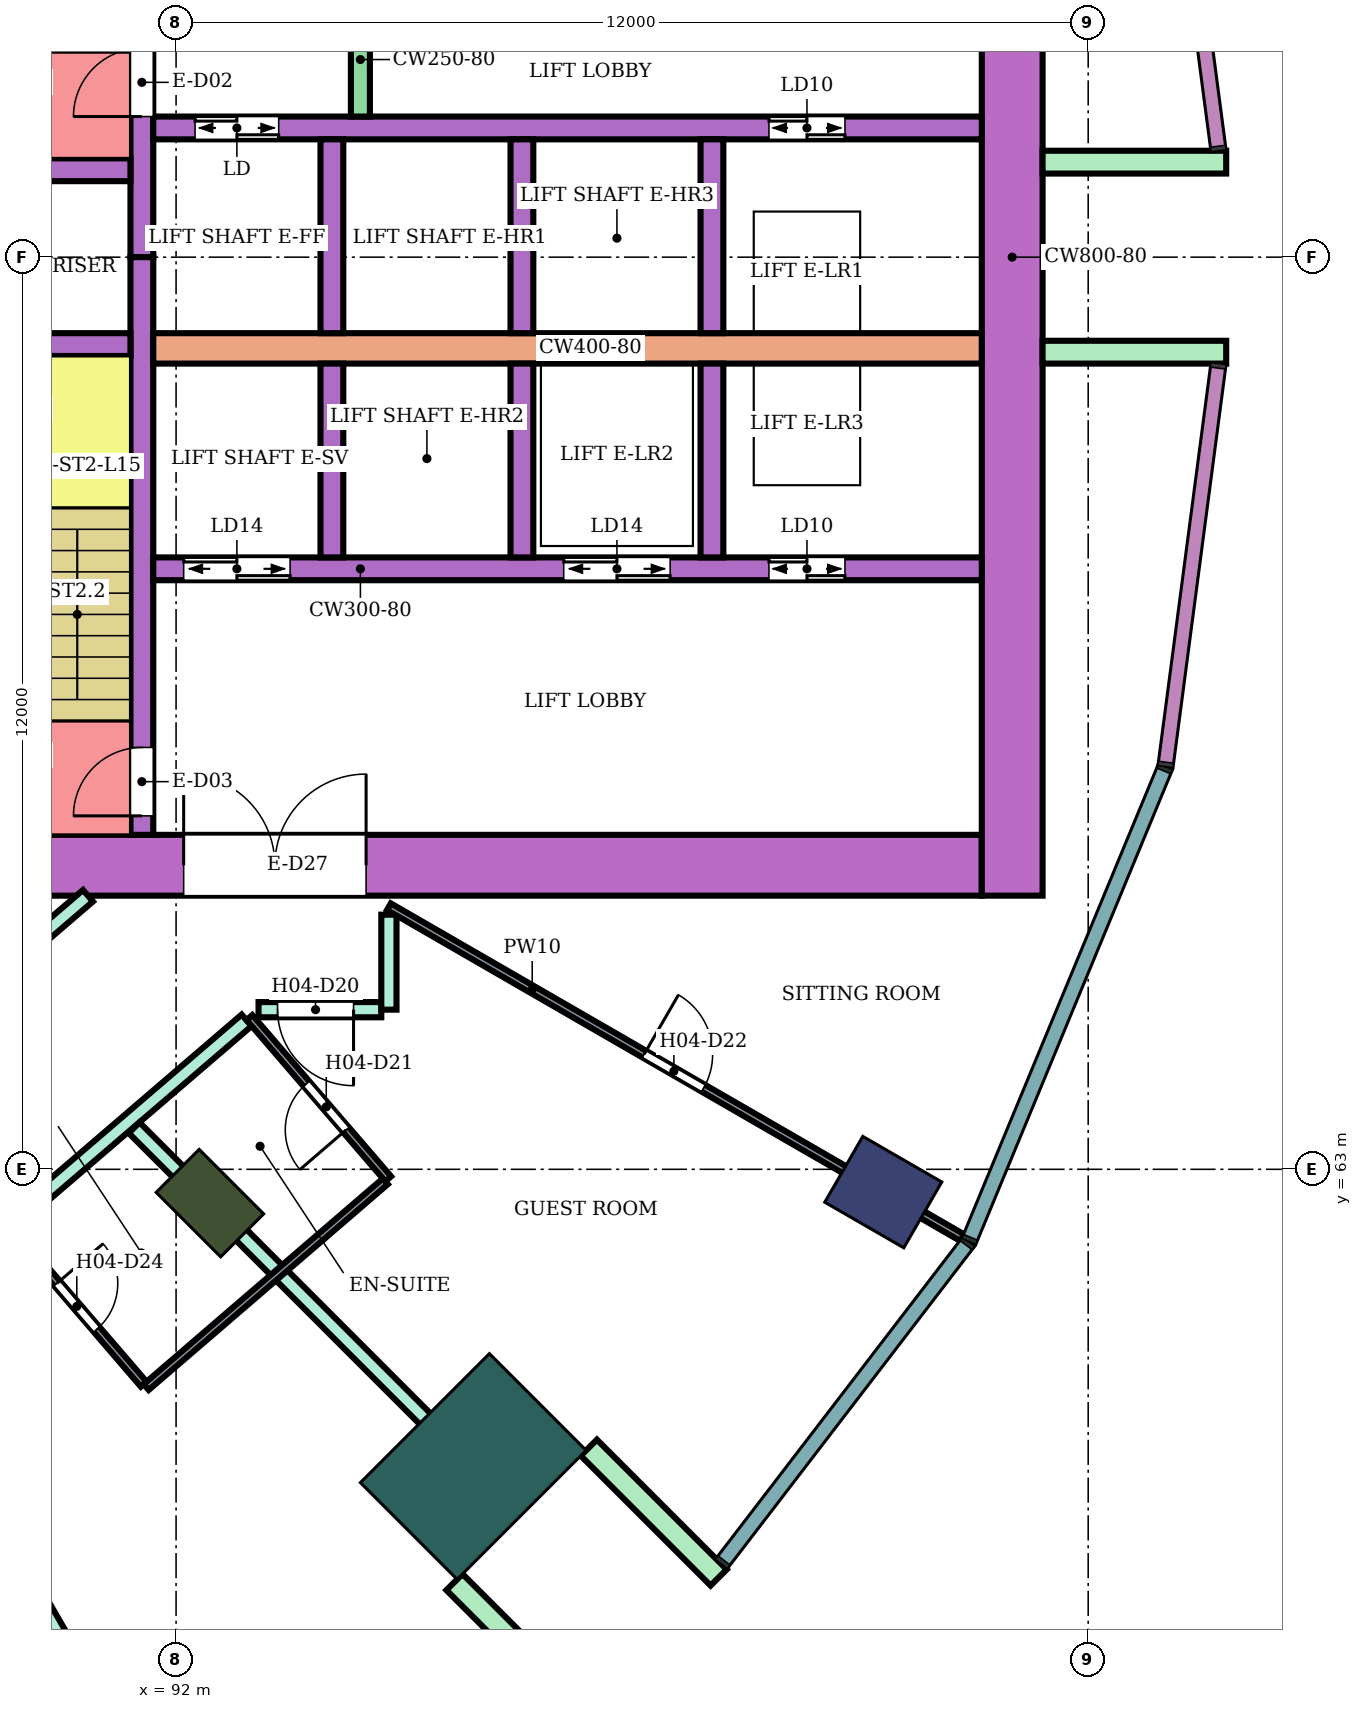
"""IFC4 building model, lengths in metres.
Left out: names, types, materials, properties, quantities, classifications, styles, units other than length and angle.
Written with IfcOpenShell. Run it as: python <this file> out.ifc"""

import sys

from ifc_helpers import new_model, si_unit, direction, frame, frame_2d, origin, origin_2d, place, context, subcontext, project, spatial, rectangle, extrude, element, fill, save


model = new_model("IFC4")
c1 = context("Model", 3, precision=1e-05, world=origin(), true_north=direction((0.0, 1.0)))
c2 = subcontext(c1, "Body", "Model", "MODEL_VIEW")
j1 = project(units=[si_unit("LENGTHUNIT", "METRE"), si_unit("PLANEANGLEUNIT", "RADIAN")], contexts=[c1])
p1 = place(None, origin())
s1 = spatial("IfcSite", under=j1, at=p1, CompositionType="ELEMENT")
p2 = place(p1, origin())
s2 = spatial("IfcBuilding", under=s1, at=p2, CompositionType="ELEMENT")
p3 = place(p2, frame((0.0, 0.0, 66.8)))
s3 = spatial("IfcBuildingStorey", under=s2, at=p3, CompositionType="ELEMENT", Elevation=66.8)
p4 = place(p3, frame((101.304, 62.7, 0.0), z_axis=(0.0, 0.0, 1.0), x_axis=(0.866025403784, -0.5, 0.0)))
e1 = element("IfcColumn", 1, at=p4, inside=s3, PredefinedType="COLUMN", context=c2, shape_type="SweptSolid", body=[
    extrude(rectangle(XDim=1.2, YDim=1.0, at=origin_2d()), origin(), (0.0, 0.0, 1.0), 3.8),
])
p5 = place(p3, frame((92.445, 62.555, 0.0), z_axis=(0.0, 0.0, 1.0), x_axis=(0.707106781187, -0.707106781187, 0.0)))
e2 = element("IfcColumn", 2, at=p5, inside=s3, PredefinedType="COLUMN", context=c2, shape_type="SweptSolid", body=[
    extrude(rectangle(XDim=1.2, YDim=0.8, at=origin_2d()), origin(), (0.0, 0.0, 1.0), 3.8),
])
p6 = place(p3, frame((95.91, 59.09, 0.0), z_axis=(0.0, 0.0, 1.0), x_axis=(0.707106781187, -0.707106781187, 0.0)))
e3 = element("IfcColumn", 3, at=p6, inside=s3, PredefinedType="COLUMN", context=c2, shape_type="SweptSolid", body=[
    extrude(rectangle(XDim=1.8, YDim=2.4, at=origin_2d()), origin(), (0.0, 0.0, 1.0), 3.8),
])
p7 = place(p3, frame((87.9, 67.0, 0.0), z_axis=(0.0, 0.0, 1.0), x_axis=(1.0, 0.0, 0.0)))
e4 = element("IfcWall", 4, at=p7, inside=s3, PredefinedType="SHEAR", context=c2, shape_type="SweptSolid", body=[
    extrude(rectangle(XDim=14.7, YDim=0.8, at=frame_2d((7.35, 0.0))), origin(), (0.0, 0.0, 1.0), 3.48),
])
p8 = place(p7, frame((4.2, 0.0, 0.0)))
e5 = element("IfcOpeningElement", 5, at=p8, cuts=e4, PredefinedType="OPENING", context=c2, shape_type="SweptSolid", body=[
    extrude(rectangle(XDim=2.4, YDim=2.4, at=frame_2d((1.2, 1.2))), frame((0.0, 0.41, 0.0), z_axis=(0.0, -1.0, 0.0), x_axis=(1.0, 0.0, 0.0)), (0.0, 0.0, 1.0), 0.82),
])
p9 = place(p3, frame((103.0, 66.6, 0.0), z_axis=(0.0, 0.0, 1.0), x_axis=(0.0, 1.0, 0.0)))
e6 = element("IfcWall", 6, at=p9, inside=s3, PredefinedType="SHEAR", context=c2, shape_type="SweptSolid", body=[
    extrude(rectangle(XDim=16.8, YDim=0.8, at=frame_2d((8.4, 0.0))), origin(), (0.0, 0.0, 1.0), 3.48),
])
p10 = place(p3, frame((91.55, 75.0, 0.0), z_axis=(0.0, 0.0, 1.0), x_axis=(0.0, 1.0, 0.0)))
e7 = element("IfcWall", 7, at=p10, inside=s3, PredefinedType="SHEAR", context=c2, shape_type="SweptSolid", body=[
    extrude(rectangle(XDim=7.6, YDim=0.3, at=frame_2d((3.8, 0.0))), origin(), (0.0, 0.0, 1.0), 3.48),
])
p11 = place(p10, frame((1.85, 0.0, 0.0)))
e8 = element("IfcOpeningElement", 8, at=p11, cuts=e7, PredefinedType="OPENING", context=c2, shape_type="SweptSolid", body=[
    extrude(rectangle(XDim=0.9, YDim=2.1, at=frame_2d((0.45, 1.05))), frame((0.0, 0.16, 0.0), z_axis=(0.0, -1.0, 0.0), x_axis=(1.0, 0.0, 0.0)), (0.0, 0.0, 1.0), 0.32),
])
p12 = place(p3, frame((91.55, 67.4, 0.0), z_axis=(0.0, 0.0, 1.0), x_axis=(0.0, 1.0, 0.0)))
e9 = element("IfcWall", 9, at=p12, inside=s3, PredefinedType="SHEAR", context=c2, shape_type="SweptSolid", body=[
    extrude(rectangle(XDim=7.6, YDim=0.3, at=frame_2d((3.8, 0.0))), origin(), (0.0, 0.0, 1.0), 3.48),
])
p13 = place(p12, frame((0.25, 0.0, 0.0)))
e10 = element("IfcOpeningElement", 10, at=p13, cuts=e9, PredefinedType="OPENING", context=c2, shape_type="SweptSolid", body=[
    extrude(rectangle(XDim=0.9, YDim=2.1, at=frame_2d((0.45, 1.05))), frame((0.0, 0.16, 0.0), z_axis=(0.0, -1.0, 0.0), x_axis=(1.0, 0.0, 0.0)), (0.0, 0.0, 1.0), 0.32),
])
p14 = place(p3, frame((88.35, 76.15, 0.0), z_axis=(0.0, 0.0, 1.0), x_axis=(1.0, 0.0, 0.0)))
e11 = element("IfcWall", 11, at=p14, inside=s3, PredefinedType="SHEAR", context=c2, shape_type="SweptSolid", body=[
    extrude(rectangle(XDim=3.05, YDim=0.3, at=frame_2d((1.525, 0.0))), origin(), (0.0, 0.0, 1.0), 3.48),
])
p15 = place(p14, frame((1.1, 0.0, 0.0)))
e12 = element("IfcOpeningElement", 12, at=p15, cuts=e11, PredefinedType="OPENING", context=c2, shape_type="SweptSolid", body=[
    extrude(rectangle(XDim=0.7, YDim=2.0, at=frame_2d((0.35, 1.0))), frame((0.0, 0.16, 0.0), z_axis=(0.0, -1.0, 0.0), x_axis=(1.0, 0.0, 0.0)), (0.0, 0.0, 1.0), 0.32),
])
p16 = place(p3, frame((88.35, 73.85, 0.0), z_axis=(0.0, 0.0, 1.0), x_axis=(1.0, 0.0, 0.0)))
e13 = element("IfcWall", 13, at=p16, inside=s3, PredefinedType="SHEAR", context=c2, shape_type="SweptSolid", body=[
    extrude(rectangle(XDim=3.05, YDim=0.3, at=frame_2d((1.525, 0.0))), origin(), (0.0, 0.0, 1.0), 3.48),
])
p17 = place(p3, frame((91.7, 76.7, 0.0), z_axis=(0.0, 0.0, 1.0), x_axis=(1.0, 0.0, 0.0)))
e14 = element("IfcWall", 14, at=p17, inside=s3, PredefinedType="SHEAR", context=c2, shape_type="SweptSolid", body=[
    extrude(rectangle(XDim=10.9, YDim=0.3, at=frame_2d((5.45, 0.0))), origin(), (0.0, 0.0, 1.0), 3.48),
])
p18 = place(p17, frame((0.55, 0.0, 0.0)))
e15 = element("IfcOpeningElement", 15, at=p18, cuts=e14, PredefinedType="OPENING", context=c2, shape_type="SweptSolid", body=[
    extrude(rectangle(XDim=1.1, YDim=2.1, at=frame_2d((0.55, 1.05))), frame((0.0, 0.16, 0.0), z_axis=(0.0, -1.0, 0.0), x_axis=(1.0, 0.0, 0.0)), (0.0, 0.0, 1.0), 0.32),
])
p19 = place(p17, frame((8.1, 0.0, 0.0)))
e16 = element("IfcOpeningElement", 16, at=p19, cuts=e14, PredefinedType="OPENING", context=c2, shape_type="SweptSolid", body=[
    extrude(rectangle(XDim=1.0, YDim=2.1, at=frame_2d((0.5, 1.05))), frame((0.0, 0.16, 0.0), z_axis=(0.0, -1.0, 0.0), x_axis=(1.0, 0.0, 0.0)), (0.0, 0.0, 1.0), 0.32),
])
p20 = place(p3, frame((91.7, 73.8, 0.0), z_axis=(0.0, 0.0, 1.0), x_axis=(1.0, 0.0, 0.0)))
e17 = element("IfcWall", 17, at=p20, inside=s3, PredefinedType="SHEAR", context=c2, shape_type="SweptSolid", body=[
    extrude(rectangle(XDim=10.9, YDim=0.4, at=frame_2d((5.45, 0.0))), origin(), (0.0, 0.0, 1.0), 3.48),
])
p21 = place(p3, frame((91.7, 70.9, 0.0), z_axis=(0.0, 0.0, 1.0), x_axis=(1.0, 0.0, 0.0)))
e18 = element("IfcWall", 18, at=p21, inside=s3, PredefinedType="SHEAR", context=c2, shape_type="SweptSolid", body=[
    extrude(rectangle(XDim=10.9, YDim=0.3, at=frame_2d((5.45, 0.0))), origin(), (0.0, 0.0, 1.0), 3.48),
])
p22 = place(p21, frame((0.4, 0.0, 0.0)))
e19 = element("IfcOpeningElement", 19, at=p22, cuts=e18, PredefinedType="OPENING", context=c2, shape_type="SweptSolid", body=[
    extrude(rectangle(XDim=1.4, YDim=2.1, at=frame_2d((0.7, 1.05))), frame((0.0, 0.16, 0.0), z_axis=(0.0, -1.0, 0.0), x_axis=(1.0, 0.0, 0.0)), (0.0, 0.0, 1.0), 0.32),
])
p23 = place(p21, frame((5.4, 0.0, 0.0)))
e20 = element("IfcOpeningElement", 20, at=p23, cuts=e18, PredefinedType="OPENING", context=c2, shape_type="SweptSolid", body=[
    extrude(rectangle(XDim=1.4, YDim=2.1, at=frame_2d((0.7, 1.05))), frame((0.0, 0.16, 0.0), z_axis=(0.0, -1.0, 0.0), x_axis=(1.0, 0.0, 0.0)), (0.0, 0.0, 1.0), 0.32),
])
p24 = place(p21, frame((8.1, 0.0, 0.0)))
e21 = element("IfcOpeningElement", 21, at=p24, cuts=e18, PredefinedType="OPENING", context=c2, shape_type="SweptSolid", body=[
    extrude(rectangle(XDim=1.0, YDim=2.1, at=frame_2d((0.5, 1.05))), frame((0.0, 0.16, 0.0), z_axis=(0.0, -1.0, 0.0), x_axis=(1.0, 0.0, 0.0)), (0.0, 0.0, 1.0), 0.32),
])
for number, where, z_axis, x_axis in (
    (22, (94.05, 74.0, 0.0), (0.0, 0.0, 1.0), (0.0, 1.0, 0.0)),
    (23, (96.55, 74.0, 0.0), (0.0, 0.0, 1.0), (0.0, 1.0, 0.0)),
    (24, (99.05, 74.0, 0.0), (0.0, 0.0, 1.0), (0.0, 1.0, 0.0)),
    (25, (94.05, 71.05, 0.0), (0.0, 0.0, 1.0), (0.0, 1.0, 0.0)),
    (26, (96.55, 71.05, 0.0), (0.0, 0.0, 1.0), (0.0, 1.0, 0.0)),
    (27, (99.05, 71.05, 0.0), (0.0, 0.0, 1.0), (0.0, 1.0, 0.0)),
):
    element("IfcWall", number, at=place(p3, frame(where, z_axis=z_axis, x_axis=x_axis)), inside=s3, PredefinedType="SHEAR", context=c2, shape_type="SweptSolid", body=[
        extrude(rectangle(XDim=2.55, YDim=0.3, at=frame_2d((1.275, 0.0))), origin(), (0.0, 0.0, 1.0), 3.48),
    ])
p25 = place(p3, frame((94.425, 76.85, 0.0), z_axis=(0.0, 0.0, 1.0), x_axis=(0.0, 1.0, 0.0)))
e28 = element("IfcWall", 28, at=p25, inside=s3, PredefinedType="SHEAR", context=c2, shape_type="SweptSolid", body=[
    extrude(rectangle(XDim=1.5, YDim=0.25, at=frame_2d((0.75, 0.0))), origin(), (0.0, 0.0, 1.0), 3.48),
])
for number, where, z_axis, x_axis in (
    (29, (103.4, 73.75, 0.0), (0.0, 0.0, 1.0), (1.0, 0.0, 0.0)),
    (30, (103.4, 76.25, 0.0), (0.0, 0.0, 1.0), (1.0, 0.0, 0.0)),
    (31, (95.662, 57.57, 0.0), (0.0, 0.0, 1.0), (0.707, -0.707, 0.0)),
    (32, (97.43, 59.338, 0.0), (0.0, 0.0, 1.0), (0.707, -0.707, 0.0)),
):
    element("IfcWall", number, at=place(p3, frame(where, z_axis=z_axis, x_axis=x_axis)), inside=s3, PredefinedType="NOTDEFINED", context=c2, shape_type="SweptSolid", body=[
        extrude(rectangle(XDim=2.416, YDim=0.3, at=frame_2d((1.208, 0.0))), origin(), (0.0, 0.0, 1.0), 3.8),
    ])
p26 = place(p3, frame((86.877, 63.189, 0.0), z_axis=(0.0, 0.0, 1.0), x_axis=(0.758088707506, 0.652151448325, 0.0)))
e33 = element("IfcWall", 33, at=p26, inside=s3, PredefinedType="PARTITIONING", context=c2, shape_type="SweptSolid", body=[
    extrude(rectangle(XDim=5.229, YDim=0.2, at=frame_2d((2.615, 0.0))), origin(), (0.0, 0.0, 1.0), 3.35),
])
p27 = place(p3, frame((88.235, 60.931, 0.0), z_axis=(0.0, 0.0, 1.0), x_axis=(0.758799498714, 0.651324282329, 0.0)))
e34 = element("IfcWall", 34, at=p27, inside=s3, PredefinedType="PARTITIONING", context=c2, shape_type="SweptSolid", body=[
    extrude(rectangle(XDim=6.186, YDim=0.2, at=frame_2d((3.093, 0.0))), origin(), (0.0, 0.0, 1.0), 3.35),
])
p28 = place(p27, frame((0.43, 0.0, 0.0)))
e35 = element("IfcOpeningElement", 35, at=p28, cuts=e34, PredefinedType="OPENING", context=c2, shape_type="SweptSolid", body=[
    extrude(rectangle(XDim=1.0, YDim=2.1, at=frame_2d((0.5, 1.05))), frame((0.0, 0.11, 0.0), z_axis=(0.0, -1.0, 0.0), x_axis=(1.0, 0.0, 0.0)), (0.0, 0.0, 1.0), 0.22),
])
p29 = place(p3, frame((88.159, 60.863, 0.0), z_axis=(0.0, 0.0, 1.0), x_axis=(0.499935840196, -0.866062443296, 0.0)))
e36 = element("IfcWall", 36, at=p29, inside=s3, PredefinedType="PARTITIONING", context=c2, shape_type="SweptSolid", body=[
    extrude(rectangle(XDim=9.475, YDim=0.2, at=frame_2d((4.737, 0.0))), origin(), (0.0, 0.0, 1.0), 3.35),
])
p30 = place(p3, frame((91.448, 63.547, 0.0), z_axis=(0.0, 0.0, 1.0), x_axis=(0.706984810649, -0.707228730688, 0.0)))
e37 = element("IfcWall", 37, at=p30, inside=s3, PredefinedType="PARTITIONING", context=c2, shape_type="SweptSolid", body=[
    extrude(rectangle(XDim=7.006, YDim=0.2, at=frame_2d((3.503, 0.0))), origin(), (0.0, 0.0, 1.0), 3.35),
])
p31 = place(p3, frame((93.085, 65.1, 0.0), z_axis=(0.0, 0.0, 1.0), x_axis=(1.0, 0.0, 0.0)))
e38 = element("IfcWall", 38, at=p31, inside=s3, PredefinedType="PARTITIONING", context=c2, shape_type="SweptSolid", body=[
    extrude(rectangle(XDim=1.615, YDim=0.2, at=frame_2d((0.808, 0.0))), origin(), (0.0, 0.0, 1.0), 3.35),
])
p32 = place(p31, frame((0.25, 0.0, 0.0)))
e39 = element("IfcOpeningElement", 39, at=p32, cuts=e38, PredefinedType="OPENING", context=c2, shape_type="SweptSolid", body=[
    extrude(rectangle(XDim=1.0, YDim=2.1, at=frame_2d((0.5, 1.05))), frame((0.0, 0.11, 0.0), z_axis=(0.0, -1.0, 0.0), x_axis=(1.0, 0.0, 0.0)), (0.0, 0.0, 1.0), 0.22),
])
p33 = place(p3, frame((94.8, 65.1, 0.0), z_axis=(0.0, 0.0, 1.0), x_axis=(0.0, 1.0, 0.0)))
e40 = element("IfcWall", 40, at=p33, inside=s3, PredefinedType="PARTITIONING", context=c2, shape_type="SweptSolid", body=[
    extrude(rectangle(XDim=1.25, YDim=0.2, at=frame_2d((0.625, 0.0))), origin(), (0.0, 0.0, 1.0), 3.35),
])
p34 = place(p3, frame((89.846, 62.182, 0.0), z_axis=(0.0, 0.0, 1.0), x_axis=(0.652095405055, -0.758136915541, 0.0)))
e41 = element("IfcWall", 41, at=p34, inside=s3, PredefinedType="PARTITIONING", context=c2, shape_type="SweptSolid", body=[
    extrude(rectangle(XDim=2.65, YDim=0.1, at=frame_2d((1.325, 0.0))), origin(), (0.0, 0.0, 1.0), 3.35),
])
p35 = place(p34, frame((0.9, 0.0, 0.0)))
e42 = element("IfcOpeningElement", 42, at=p35, cuts=e41, PredefinedType="OPENING", context=c2, shape_type="SweptSolid", body=[
    extrude(rectangle(XDim=0.8, YDim=2.1, at=frame_2d((0.4, 1.05))), frame((0.0, 0.06, 0.0), z_axis=(0.0, -1.0, 0.0), x_axis=(1.0, 0.0, 0.0)), (0.0, 0.0, 1.0), 0.12),
])
p36 = place(p3, frame((91.607, 60.135, 0.0), z_axis=(0.0, 0.0, 1.0), x_axis=(0.758121792225, 0.65211298726, 0.0)))
e43 = element("IfcWall", 43, at=p36, inside=s3, PredefinedType="PARTITIONING", context=c2, shape_type="SweptSolid", body=[
    extrude(rectangle(XDim=4.15, YDim=0.1, at=frame_2d((2.075, 0.0))), origin(), (0.0, 0.0, 1.0), 3.35),
])
p37 = place(p3, frame((92.965, 64.997, 0.0), z_axis=(0.0, 0.0, 1.0), x_axis=(0.652104424393, -0.758129157655, 0.0)))
e44 = element("IfcWall", 44, at=p37, inside=s3, PredefinedType="PARTITIONING", context=c2, shape_type="SweptSolid", body=[
    extrude(rectangle(XDim=2.8, YDim=0.1, at=frame_2d((1.4, 0.0))), origin(), (0.0, 0.0, 1.0), 3.35),
])
p38 = place(p37, frame((1.15, 0.0, 0.0)))
e45 = element("IfcOpeningElement", 45, at=p38, cuts=e44, PredefinedType="OPENING", context=c2, shape_type="SweptSolid", body=[
    extrude(rectangle(XDim=0.8, YDim=2.1, at=frame_2d((0.4, 1.05))), frame((0.0, 0.06, 0.0), z_axis=(0.0, -1.0, 0.0), x_axis=(1.0, 0.0, 0.0)), (0.0, 0.0, 1.0), 0.12),
])
p39 = place(p3, frame((94.8, 66.455, 0.0), z_axis=(0.0, 0.0, 1.0), x_axis=(0.86602264145, -0.500004784474, 0.0)))
e46 = element("IfcWall", 46, at=p39, inside=s3, PredefinedType="PARTITIONING", context=c2, shape_type="SweptSolid", body=[
    extrude(rectangle(XDim=8.708, YDim=0.1, at=frame_2d((4.354, 0.0))), origin(), (0.0, 0.0, 1.0), 3.35),
])
p40 = place(p39, frame((3.879, 0.0, 0.0)))
e47 = element("IfcOpeningElement", 47, at=p40, cuts=e46, PredefinedType="OPENING", context=c2, shape_type="SweptSolid", body=[
    extrude(rectangle(XDim=0.9, YDim=2.1, at=frame_2d((0.45, 1.05))), frame((0.0, 0.06, 0.0), z_axis=(0.0, -1.0, 0.0), x_axis=(1.0, 0.0, 0.0)), (0.0, 0.0, 1.0), 0.12),
])
p41 = place(p32, frame((1.0, 0.0, 0.0), z_axis=(0.0, 0.0, 1.0), x_axis=(-1.0, 0.0, 0.0)))
e48 = element("IfcDoor", 48, at=p41, inside=s3, OperationType="SINGLE_SWING_LEFT", PredefinedType="DOOR", context=c2, shape_type="SweptSolid", body=[
    extrude(rectangle(XDim=1.0, YDim=2.1, at=frame_2d((0.5, 1.05))), frame((0.0, 0.025, 0.0), z_axis=(0.0, -1.0, 0.0), x_axis=(1.0, 0.0, 0.0)), (0.0, 0.0, 1.0), 0.05),
])
fill(e39, e48)
p42 = place(p38, frame((0.8, 0.0, 0.0), z_axis=(0.0, 0.0, 1.0), x_axis=(-1.0, 0.0, 0.0)))
e49 = element("IfcDoor", 49, at=p42, inside=s3, OperationType="SINGLE_SWING_LEFT", PredefinedType="DOOR", context=c2, shape_type="SweptSolid", body=[
    extrude(rectangle(XDim=0.8, YDim=2.1, at=frame_2d((0.4, 1.05))), frame((0.0, 0.025, 0.0), z_axis=(0.0, -1.0, 0.0), x_axis=(1.0, 0.0, 0.0)), (0.0, 0.0, 1.0), 0.05),
])
fill(e45, e49)
p43 = place(p40, origin())
e50 = element("IfcDoor", 50, at=p43, inside=s3, OperationType="SINGLE_SWING_LEFT", PredefinedType="DOOR", context=c2, shape_type="SweptSolid", body=[
    extrude(rectangle(XDim=0.9, YDim=2.1, at=frame_2d((0.45, 1.05))), frame((0.0, 0.025, 0.0), z_axis=(0.0, -1.0, 0.0), x_axis=(1.0, 0.0, 0.0)), (0.0, 0.0, 1.0), 0.05),
])
fill(e47, e50)
p44 = place(p35, origin())
e51 = element("IfcDoor", 51, at=p44, inside=s3, OperationType="SINGLE_SWING_LEFT", PredefinedType="DOOR", context=c2, shape_type="SweptSolid", body=[
    extrude(rectangle(XDim=0.8, YDim=2.1, at=frame_2d((0.4, 1.05))), frame((0.0, 0.025, 0.0), z_axis=(0.0, -1.0, 0.0), x_axis=(1.0, 0.0, 0.0)), (0.0, 0.0, 1.0), 0.05),
])
fill(e42, e51)
p45 = place(p11, origin())
e52 = element("IfcDoor", 52, at=p45, inside=s3, OperationType="SINGLE_SWING_LEFT", PredefinedType="DOOR", context=c2, shape_type="SweptSolid", body=[
    extrude(rectangle(XDim=0.9, YDim=2.1, at=frame_2d((0.45, 1.05))), frame((0.0, 0.025, 0.0), z_axis=(0.0, -1.0, 0.0), x_axis=(1.0, 0.0, 0.0)), (0.0, 0.0, 1.0), 0.05),
])
fill(e8, e52)
p46 = place(p13, origin())
e53 = element("IfcDoor", 53, at=p46, inside=s3, OperationType="SINGLE_SWING_LEFT", PredefinedType="DOOR", context=c2, shape_type="SweptSolid", body=[
    extrude(rectangle(XDim=0.9, YDim=2.1, at=frame_2d((0.45, 1.05))), frame((0.0, 0.025, 0.0), z_axis=(0.0, -1.0, 0.0), x_axis=(1.0, 0.0, 0.0)), (0.0, 0.0, 1.0), 0.05),
])
fill(e10, e53)
p47 = place(p18, origin())
e54 = element("IfcDoor", 54, at=p47, inside=s3, OperationType="DOUBLE_DOOR_SLIDING", PredefinedType="DOOR", context=c2, shape_type="SweptSolid", body=[
    extrude(rectangle(XDim=1.1, YDim=2.1, at=frame_2d((0.55, 1.05))), frame((0.0, 0.025, 0.0), z_axis=(0.0, -1.0, 0.0), x_axis=(1.0, 0.0, 0.0)), (0.0, 0.0, 1.0), 0.05),
])
fill(e15, e54)
p48 = place(p19, origin())
e55 = element("IfcDoor", 55, at=p48, inside=s3, OperationType="DOUBLE_DOOR_SLIDING", PredefinedType="DOOR", context=c2, shape_type="SweptSolid", body=[
    extrude(rectangle(XDim=1.0, YDim=2.1, at=frame_2d((0.5, 1.05))), frame((0.0, 0.025, 0.0), z_axis=(0.0, -1.0, 0.0), x_axis=(1.0, 0.0, 0.0)), (0.0, 0.0, 1.0), 0.05),
])
fill(e16, e55)
p49 = place(p22, origin())
e56 = element("IfcDoor", 56, at=p49, inside=s3, OperationType="DOUBLE_DOOR_SLIDING", PredefinedType="DOOR", context=c2, shape_type="SweptSolid", body=[
    extrude(rectangle(XDim=1.4, YDim=2.1, at=frame_2d((0.7, 1.05))), frame((0.0, 0.025, 0.0), z_axis=(0.0, -1.0, 0.0), x_axis=(1.0, 0.0, 0.0)), (0.0, 0.0, 1.0), 0.05),
])
fill(e19, e56)
p50 = place(p23, origin())
e57 = element("IfcDoor", 57, at=p50, inside=s3, OperationType="DOUBLE_DOOR_SLIDING", PredefinedType="DOOR", context=c2, shape_type="SweptSolid", body=[
    extrude(rectangle(XDim=1.4, YDim=2.1, at=frame_2d((0.7, 1.05))), frame((0.0, 0.025, 0.0), z_axis=(0.0, -1.0, 0.0), x_axis=(1.0, 0.0, 0.0)), (0.0, 0.0, 1.0), 0.05),
])
fill(e20, e57)
p51 = place(p24, origin())
e58 = element("IfcDoor", 58, at=p51, inside=s3, OperationType="DOUBLE_DOOR_SLIDING", PredefinedType="DOOR", context=c2, shape_type="SweptSolid", body=[
    extrude(rectangle(XDim=1.0, YDim=2.1, at=frame_2d((0.5, 1.05))), frame((0.0, 0.025, 0.0), z_axis=(0.0, -1.0, 0.0), x_axis=(1.0, 0.0, 0.0)), (0.0, 0.0, 1.0), 0.05),
])
fill(e21, e58)
p52 = place(p8, origin())
e59 = element("IfcDoor", 59, at=p52, inside=s3, OperationType="DOUBLE_DOOR_SINGLE_SWING", PredefinedType="DOOR", context=c2, shape_type="SweptSolid", body=[
    extrude(rectangle(XDim=2.4, YDim=2.4, at=frame_2d((1.2, 1.2))), frame((0.0, 0.025, 0.0), z_axis=(0.0, -1.0, 0.0), x_axis=(1.0, 0.0, 0.0)), (0.0, 0.0, 1.0), 0.05),
])
fill(e5, e59)
save(model, sys.argv[1])
